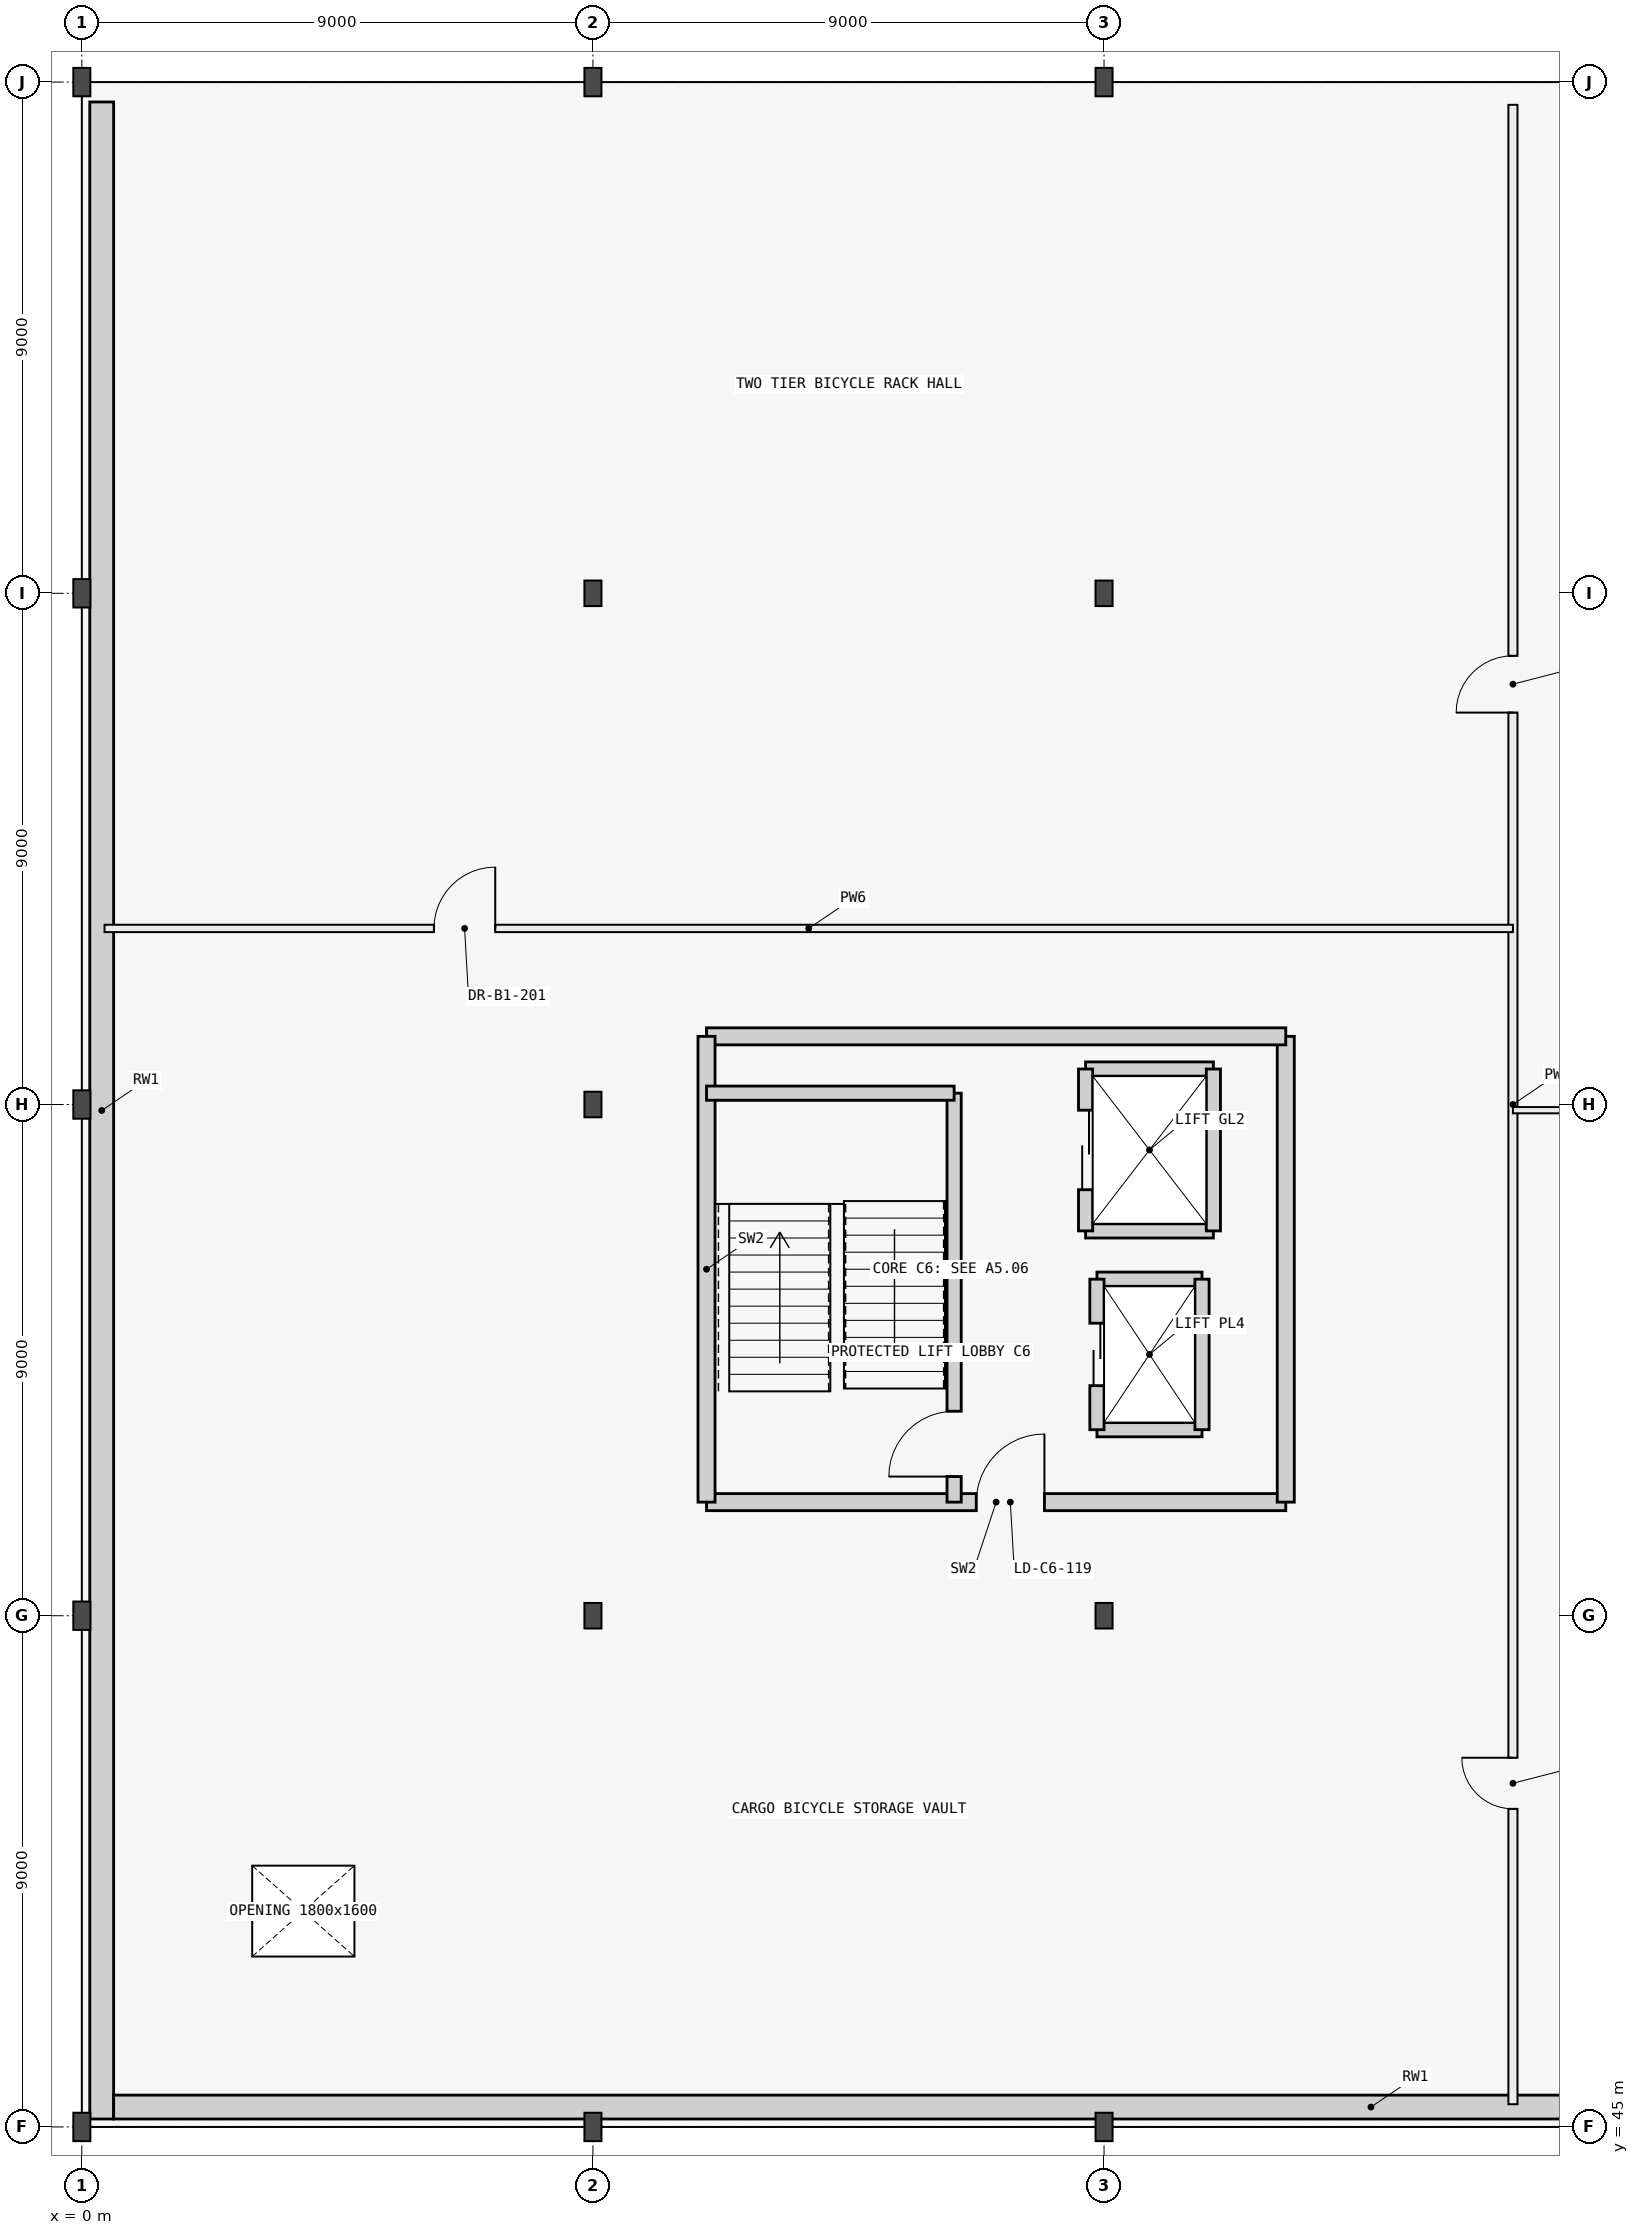
"""IFC4 building model, lengths in metres.
Left out: names, types, materials, properties, quantities, classifications, styles, units other than length and angle.
Written with IfcOpenShell. Run it as: python <this file> out.ifc"""

import sys

from ifc_helpers import new_model, si_unit, direction, frame, frame_2d, origin, origin_2d, place, context, subcontext, project, spatial, rectangle, i_section, extrude, element, fill, save


model = new_model("IFC4")
c1 = context("Model", 3, precision=1e-05, world=origin(), true_north=direction((0.0, 1.0)))
c2 = subcontext(c1, "Body", "Model", "MODEL_VIEW")
j1 = project(units=[si_unit("LENGTHUNIT", "METRE"), si_unit("PLANEANGLEUNIT", "RADIAN")], contexts=[c1])
p1 = place(None, origin())
s1 = spatial("IfcSite", under=j1, at=p1, CompositionType="ELEMENT")
p2 = place(p1, origin())
s2 = spatial("IfcBuilding", under=s1, at=p2, CompositionType="ELEMENT")
p3 = place(p2, frame((0.0, 0.0, -4.2)))
s3 = spatial("IfcBuildingStorey", under=s2, at=p3, CompositionType="ELEMENT", Elevation=-4.2)
for number, where, z_axis, x_axis in (
    (1, (0.0, 45.0, 0.0), (0.0, 0.0, 1.0), (1.0, 0.0, 0.0)),
    (2, (9.0, 45.0, 0.0), (0.0, 0.0, 1.0), (1.0, 0.0, 0.0)),
    (3, (18.0, 45.0, 0.0), (0.0, 0.0, 1.0), (1.0, 0.0, 0.0)),
    (4, (0.0, 54.0, 0.0), (0.0, 0.0, 1.0), (1.0, 0.0, 0.0)),
):
    element("IfcColumn", number, at=place(p3, frame(where, z_axis=z_axis, x_axis=x_axis)), inside=s3, PredefinedType="COLUMN", context=c2, shape_type="SweptSolid", body=[
        extrude(i_section(OverallWidth=0.3, OverallDepth=0.5, WebThickness=0.014, FlangeThickness=0.028, FilletRadius=0.027, at=origin_2d()), origin(), (0.0, 0.0, 1.0), 4.2),
    ])
for number, where, z_axis, x_axis in (
    (5, (9.0, 54.0, 0.0), (0.0, 0.0, 1.0), (1.0, 0.0, 0.0)),
    (6, (18.0, 54.0, 0.0), (0.0, 0.0, 1.0), (1.0, 0.0, 0.0)),
):
    element("IfcColumn", number, at=place(p3, frame(where, z_axis=z_axis, x_axis=x_axis)), inside=s3, PredefinedType="COLUMN", context=c2, shape_type="SweptSolid", body=[
        extrude(i_section(OverallWidth=0.3, OverallDepth=0.45, WebThickness=0.014, FlangeThickness=0.026, FilletRadius=0.027, at=origin_2d()), origin(), (0.0, 0.0, 1.0), 4.2),
    ])
p4 = place(p3, frame((0.0, 63.0, 0.0), z_axis=(0.0, 0.0, 1.0), x_axis=(1.0, 0.0, 0.0)))
e7 = element("IfcColumn", 7, at=p4, inside=s3, PredefinedType="COLUMN", context=c2, shape_type="SweptSolid", body=[
    extrude(i_section(OverallWidth=0.3, OverallDepth=0.5, WebThickness=0.014, FlangeThickness=0.028, FilletRadius=0.027, at=origin_2d()), origin(), (0.0, 0.0, 1.0), 4.2),
])
p5 = place(p3, frame((9.0, 63.0, 0.0), z_axis=(0.0, 0.0, 1.0), x_axis=(1.0, 0.0, 0.0)))
e8 = element("IfcColumn", 8, at=p5, inside=s3, PredefinedType="COLUMN", context=c2, shape_type="SweptSolid", body=[
    extrude(i_section(OverallWidth=0.3, OverallDepth=0.45, WebThickness=0.014, FlangeThickness=0.026, FilletRadius=0.027, at=origin_2d()), origin(), (0.0, 0.0, 1.0), 4.2),
])
p6 = place(p3, frame((0.0, 72.0, 0.0), z_axis=(0.0, 0.0, 1.0), x_axis=(1.0, 0.0, 0.0)))
e9 = element("IfcColumn", 9, at=p6, inside=s3, PredefinedType="COLUMN", context=c2, shape_type="SweptSolid", body=[
    extrude(i_section(OverallWidth=0.3, OverallDepth=0.5, WebThickness=0.014, FlangeThickness=0.028, FilletRadius=0.027, at=origin_2d()), origin(), (0.0, 0.0, 1.0), 4.2),
])
for number, where, z_axis, x_axis in (
    (10, (9.0, 72.0, 0.0), (0.0, 0.0, 1.0), (1.0, 0.0, 0.0)),
    (11, (18.0, 72.0, 0.0), (0.0, 0.0, 1.0), (1.0, 0.0, 0.0)),
):
    element("IfcColumn", number, at=place(p3, frame(where, z_axis=z_axis, x_axis=x_axis)), inside=s3, PredefinedType="COLUMN", context=c2, shape_type="SweptSolid", body=[
        extrude(i_section(OverallWidth=0.3, OverallDepth=0.45, WebThickness=0.014, FlangeThickness=0.026, FilletRadius=0.027, at=origin_2d()), origin(), (0.0, 0.0, 1.0), 4.2),
    ])
for number, where, z_axis, x_axis in (
    (12, (0.0, 81.0, 0.0), (0.0, 0.0, 1.0), (1.0, 0.0, 0.0)),
    (13, (9.0, 81.0, 0.0), (0.0, 0.0, 1.0), (1.0, 0.0, 0.0)),
    (14, (18.0, 81.0, 0.0), (0.0, 0.0, 1.0), (1.0, 0.0, 0.0)),
):
    element("IfcColumn", number, at=place(p3, frame(where, z_axis=z_axis, x_axis=x_axis)), inside=s3, PredefinedType="COLUMN", context=c2, shape_type="SweptSolid", body=[
        extrude(i_section(OverallWidth=0.3, OverallDepth=0.5, WebThickness=0.014, FlangeThickness=0.028, FilletRadius=0.027, at=origin_2d()), origin(), (0.0, 0.0, 1.0), 4.2),
    ])
p7 = place(p3, frame((0.35, 45.14, 0.0), z_axis=(0.0, 0.0, 1.0), x_axis=(0.0, 1.0, 0.0)))
e15 = element("IfcWall", 15, at=p7, inside=s3, PredefinedType="USERDEFINED", context=c2, shape_type="SweptSolid", body=[
    extrude(rectangle(XDim=35.51, YDim=0.42, at=frame_2d((17.755, 0.0))), origin(), (0.0, 0.0, 1.0), 3.6),
])
p8 = place(p3, frame((0.56, 45.35, 0.0), z_axis=(0.0, 0.0, 1.0), x_axis=(1.0, 0.0, 0.0)))
e16 = element("IfcWall", 16, at=p8, inside=s3, PredefinedType="USERDEFINED", context=c2, shape_type="SweptSolid", body=[
    extrude(rectangle(XDim=44.28, YDim=0.42, at=frame_2d((22.14, 0.0))), origin(), (0.0, 0.0, 1.0), 3.6),
])
p9 = place(p3, frame((11.0, 56.0, 0.0), z_axis=(0.0, 0.0, 1.0), x_axis=(1.0, 0.0, 0.0)))
e17 = element("IfcWall", 17, at=p9, inside=s3, PredefinedType="SHEAR", context=c2, shape_type="SweptSolid", body=[
    extrude(rectangle(XDim=10.2, YDim=0.3, at=frame_2d((5.1, 0.0))), origin(), (0.0, 0.0, 1.0), 3.94),
])
p10 = place(p9, frame((4.75, 0.0, 0.0)))
e18 = element("IfcOpeningElement", 18, at=p10, cuts=e17, PredefinedType="OPENING", context=c2, shape_type="SweptSolid", body=[
    extrude(rectangle(XDim=1.2, YDim=2.15, at=frame_2d((0.6, 1.075))), frame((0.0, 0.16, 0.0), z_axis=(0.0, -1.0, 0.0), x_axis=(1.0, 0.0, 0.0)), (0.0, 0.0, 1.0), 0.32),
])
p11 = place(p3, frame((21.2, 56.0, 0.0), z_axis=(0.0, 0.0, 1.0), x_axis=(0.0, 1.0, 0.0)))
e19 = element("IfcWall", 19, at=p11, inside=s3, PredefinedType="SHEAR", context=c2, shape_type="SweptSolid", body=[
    extrude(rectangle(XDim=8.2, YDim=0.3, at=frame_2d((4.1, 0.0))), origin(), (0.0, 0.0, 1.0), 3.94),
])
p12 = place(p3, frame((21.2, 64.2, 0.0), z_axis=(0.0, 0.0, 1.0), x_axis=(-1.0, 0.0, 0.0)))
e20 = element("IfcWall", 20, at=p12, inside=s3, PredefinedType="SHEAR", context=c2, shape_type="SweptSolid", body=[
    extrude(rectangle(XDim=10.2, YDim=0.3, at=frame_2d((5.1, 0.0))), origin(), (0.0, 0.0, 1.0), 3.94),
])
p13 = place(p3, frame((11.0, 64.2, 0.0), z_axis=(0.0, 0.0, 1.0), x_axis=(0.0, -1.0, 0.0)))
e21 = element("IfcWall", 21, at=p13, inside=s3, PredefinedType="SHEAR", context=c2, shape_type="SweptSolid", body=[
    extrude(rectangle(XDim=8.2, YDim=0.3, at=frame_2d((4.1, 0.0))), origin(), (0.0, 0.0, 1.0), 3.94),
])
p14 = place(p3, frame((15.36, 56.0, 0.0), z_axis=(0.0, 0.0, 1.0), x_axis=(0.0, 1.0, 0.0)))
e22 = element("IfcWall", 22, at=p14, inside=s3, PredefinedType="SHEAR", context=c2, shape_type="SweptSolid", body=[
    extrude(rectangle(XDim=7.2, YDim=0.25, at=frame_2d((3.6, 0.0))), origin(), (0.0, 0.0, 1.0), 3.94),
])
p15 = place(p14, frame((0.45, 0.0, 0.0)))
e23 = element("IfcOpeningElement", 23, at=p15, cuts=e22, PredefinedType="OPENING", context=c2, shape_type="SweptSolid", body=[
    extrude(rectangle(XDim=1.15, YDim=2.15, at=frame_2d((0.575, 1.075))), frame((0.0, 0.135, 0.0), z_axis=(0.0, -1.0, 0.0), x_axis=(1.0, 0.0, 0.0)), (0.0, 0.0, 1.0), 0.27),
])
p16 = place(p3, frame((11.0, 63.2, 0.0), z_axis=(0.0, 0.0, 1.0), x_axis=(1.0, 0.0, 0.0)))
e24 = element("IfcWall", 24, at=p16, inside=s3, PredefinedType="SHEAR", context=c2, shape_type="SweptSolid", body=[
    extrude(rectangle(XDim=4.36, YDim=0.25, at=frame_2d((2.18, 0.0))), origin(), (0.0, 0.0, 1.0), 3.94),
])
for number, where, z_axis, x_axis in (
    (25, (17.875, 57.275, 0.0), (0.0, 0.0, 1.0), (1.0, 0.0, 0.0)),
    (26, (17.875, 59.925, 0.0), (0.0, 0.0, 1.0), (1.0, 0.0, 0.0)),
):
    element("IfcWall", number, at=place(p3, frame(where, z_axis=z_axis, x_axis=x_axis)), inside=s3, PredefinedType="SHEAR", context=c2, shape_type="SweptSolid", body=[
        extrude(rectangle(XDim=1.85, YDim=0.25, at=frame_2d((0.925, 0.0))), origin(), (0.0, 0.0, 1.0), 3.94),
    ])
p17 = place(p3, frame((19.725, 57.275, 0.0), z_axis=(0.0, 0.0, 1.0), x_axis=(0.0, 1.0, 0.0)))
e27 = element("IfcWall", 27, at=p17, inside=s3, PredefinedType="SHEAR", context=c2, shape_type="SweptSolid", body=[
    extrude(rectangle(XDim=2.65, YDim=0.25, at=frame_2d((1.325, 0.0))), origin(), (0.0, 0.0, 1.0), 3.94),
])
p18 = place(p3, frame((17.875, 57.275, 0.0), z_axis=(0.0, 0.0, 1.0), x_axis=(0.0, 1.0, 0.0)))
e28 = element("IfcWall", 28, at=p18, inside=s3, PredefinedType="SHEAR", context=c2, shape_type="SweptSolid", body=[
    extrude(rectangle(XDim=2.65, YDim=0.25, at=frame_2d((1.325, 0.0))), origin(), (0.0, 0.0, 1.0), 3.94),
])
p19 = place(p18, frame((0.775, 0.0, 0.0)))
e29 = element("IfcOpeningElement", 29, at=p19, cuts=e28, PredefinedType="OPENING", context=c2, shape_type="SweptSolid", body=[
    extrude(rectangle(XDim=1.1, YDim=2.15, at=frame_2d((0.55, 1.075))), frame((0.0, 0.135, 0.0), z_axis=(0.0, -1.0, 0.0), x_axis=(1.0, 0.0, 0.0)), (0.0, 0.0, 1.0), 0.27),
])
for number, where, z_axis, x_axis in (
    (30, (17.675, 60.775, 0.0), (0.0, 0.0, 1.0), (1.0, 0.0, 0.0)),
    (31, (17.675, 63.625, 0.0), (0.0, 0.0, 1.0), (1.0, 0.0, 0.0)),
):
    element("IfcWall", number, at=place(p3, frame(where, z_axis=z_axis, x_axis=x_axis)), inside=s3, PredefinedType="SHEAR", context=c2, shape_type="SweptSolid", body=[
        extrude(rectangle(XDim=2.25, YDim=0.25, at=frame_2d((1.125, 0.0))), origin(), (0.0, 0.0, 1.0), 3.94),
    ])
p20 = place(p3, frame((19.925, 60.775, 0.0), z_axis=(0.0, 0.0, 1.0), x_axis=(0.0, 1.0, 0.0)))
e32 = element("IfcWall", 32, at=p20, inside=s3, PredefinedType="SHEAR", context=c2, shape_type="SweptSolid", body=[
    extrude(rectangle(XDim=2.85, YDim=0.25, at=frame_2d((1.425, 0.0))), origin(), (0.0, 0.0, 1.0), 3.94),
])
p21 = place(p3, frame((17.675, 60.775, 0.0), z_axis=(0.0, 0.0, 1.0), x_axis=(0.0, 1.0, 0.0)))
e33 = element("IfcWall", 33, at=p21, inside=s3, PredefinedType="SHEAR", context=c2, shape_type="SweptSolid", body=[
    extrude(rectangle(XDim=2.85, YDim=0.25, at=frame_2d((1.425, 0.0))), origin(), (0.0, 0.0, 1.0), 3.94),
])
p22 = place(p21, frame((0.725, 0.0, 0.0)))
e34 = element("IfcOpeningElement", 34, at=p22, cuts=e33, PredefinedType="OPENING", context=c2, shape_type="SweptSolid", body=[
    extrude(rectangle(XDim=1.4, YDim=2.2, at=frame_2d((0.7, 1.1))), frame((0.0, 0.135, 0.0), z_axis=(0.0, -1.0, 0.0), x_axis=(1.0, 0.0, 0.0)), (0.0, 0.0, 1.0), 0.27),
])
p23 = place(p3, frame((25.2, 45.4, 0.0), z_axis=(0.0, 0.0, 1.0), x_axis=(0.0, 1.0, 0.0)))
e35 = element("IfcWall", 35, at=p23, inside=s3, PredefinedType="PARTITIONING", context=c2, shape_type="SweptSolid", body=[
    extrude(rectangle(XDim=35.2, YDim=0.16, at=frame_2d((17.6, 0.0))), origin(), (0.0, 0.0, 1.0), 3.94),
])
p24 = place(p23, frame((5.2, 0.0, 0.0)))
e36 = element("IfcOpeningElement", 36, at=p24, cuts=e35, PredefinedType="OPENING", context=c2, shape_type="SweptSolid", body=[
    extrude(rectangle(XDim=0.9, YDim=2.1, at=frame_2d((0.45, 1.05))), frame((0.0, 0.09, 0.0), z_axis=(0.0, -1.0, 0.0), x_axis=(1.0, 0.0, 0.0)), (0.0, 0.0, 1.0), 0.18),
])
p25 = place(p23, frame((24.5, 0.0, 0.0)))
e37 = element("IfcOpeningElement", 37, at=p25, cuts=e35, PredefinedType="OPENING", context=c2, shape_type="SweptSolid", body=[
    extrude(rectangle(XDim=1.0, YDim=2.1, at=frame_2d((0.5, 1.05))), frame((0.0, 0.09, 0.0), z_axis=(0.0, -1.0, 0.0), x_axis=(1.0, 0.0, 0.0)), (0.0, 0.0, 1.0), 0.18),
])
p26 = place(p3, frame((0.4, 66.1, 0.0), z_axis=(0.0, 0.0, 1.0), x_axis=(1.0, 0.0, 0.0)))
e38 = element("IfcWall", 38, at=p26, inside=s3, PredefinedType="PARTITIONING", context=c2, shape_type="SweptSolid", body=[
    extrude(rectangle(XDim=24.8, YDim=0.13, at=frame_2d((12.4, 0.0))), origin(), (0.0, 0.0, 1.0), 3.94),
])
p27 = place(p26, frame((5.8, 0.0, 0.0)))
e39 = element("IfcOpeningElement", 39, at=p27, cuts=e38, PredefinedType="OPENING", context=c2, shape_type="SweptSolid", body=[
    extrude(rectangle(XDim=1.08, YDim=2.12, at=frame_2d((0.54, 1.06))), frame((0.0, 0.075, 0.0), z_axis=(0.0, -1.0, 0.0), x_axis=(1.0, 0.0, 0.0)), (0.0, 0.0, 1.0), 0.15),
])
p28 = place(p3, frame((25.2, 62.9, 0.0), z_axis=(0.0, 0.0, 1.0), x_axis=(1.0, 0.0, 0.0)))
e40 = element("IfcWall", 40, at=p28, inside=s3, PredefinedType="PARTITIONING", context=c2, shape_type="SweptSolid", body=[
    extrude(rectangle(XDim=23.975, YDim=0.11, at=frame_2d((11.988, 0.0))), origin(), (0.0, 0.0, 1.0), 3.415),
])
p29 = place(p28, frame((6.5, 0.0, 0.0)))
e41 = element("IfcOpeningElement", 41, at=p29, cuts=e40, PredefinedType="OPENING", context=c2, shape_type="SweptSolid", body=[
    extrude(rectangle(XDim=1.18, YDim=2.15, at=frame_2d((0.59, 1.075))), frame((0.0, 0.065, 0.0), z_axis=(0.0, -1.0, 0.0), x_axis=(1.0, 0.0, 0.0)), (0.0, 0.0, 1.0), 0.13),
])
p30 = place(p15, origin())
e42 = element("IfcDoor", 42, at=p30, inside=s3, OperationType="SINGLE_SWING_LEFT", PredefinedType="DOOR", context=c2, shape_type="SweptSolid", body=[
    extrude(rectangle(XDim=1.15, YDim=2.15, at=frame_2d((0.575, 1.075))), frame((0.0, 0.025, 0.0), z_axis=(0.0, -1.0, 0.0), x_axis=(1.0, 0.0, 0.0)), (0.0, 0.0, 1.0), 0.05),
])
fill(e23, e42)
p31 = place(p10, origin())
e43 = element("IfcDoor", 43, at=p31, inside=s3, OperationType="SINGLE_SWING_RIGHT", PredefinedType="DOOR", context=c2, shape_type="SweptSolid", body=[
    extrude(rectangle(XDim=1.2, YDim=2.15, at=frame_2d((0.6, 1.075))), frame((0.0, 0.025, 0.0), z_axis=(0.0, -1.0, 0.0), x_axis=(1.0, 0.0, 0.0)), (0.0, 0.0, 1.0), 0.05),
])
fill(e18, e43)
p32 = place(p19, origin())
e44 = element("IfcDoor", 44, at=p32, inside=s3, OperationType="DOUBLE_DOOR_SLIDING", PredefinedType="USERDEFINED", context=c2, shape_type="SweptSolid", body=[
    extrude(rectangle(XDim=1.1, YDim=2.15, at=frame_2d((0.55, 1.075))), frame((0.0, 0.025, 0.0), z_axis=(0.0, -1.0, 0.0), x_axis=(1.0, 0.0, 0.0)), (0.0, 0.0, 1.0), 0.05),
])
fill(e29, e44)
p33 = place(p22, origin())
e45 = element("IfcDoor", 45, at=p33, inside=s3, OperationType="DOUBLE_DOOR_SLIDING", PredefinedType="USERDEFINED", context=c2, shape_type="SweptSolid", body=[
    extrude(rectangle(XDim=1.4, YDim=2.2, at=frame_2d((0.7, 1.1))), frame((0.0, 0.025, 0.0), z_axis=(0.0, -1.0, 0.0), x_axis=(1.0, 0.0, 0.0)), (0.0, 0.0, 1.0), 0.05),
])
fill(e34, e45)
p34 = place(p24, origin())
e46 = element("IfcDoor", 46, at=p34, inside=s3, OperationType="SINGLE_SWING_RIGHT", PredefinedType="DOOR", context=c2, shape_type="SweptSolid", body=[
    extrude(rectangle(XDim=0.9, YDim=2.1, at=frame_2d((0.45, 1.05))), frame((0.0, 0.025, 0.0), z_axis=(0.0, -1.0, 0.0), x_axis=(1.0, 0.0, 0.0)), (0.0, 0.0, 1.0), 0.05),
])
fill(e36, e46)
p35 = place(p25, origin())
e47 = element("IfcDoor", 47, at=p35, inside=s3, OperationType="SINGLE_SWING_LEFT", PredefinedType="DOOR", context=c2, shape_type="SweptSolid", body=[
    extrude(rectangle(XDim=1.0, YDim=2.1, at=frame_2d((0.5, 1.05))), frame((0.0, 0.025, 0.0), z_axis=(0.0, -1.0, 0.0), x_axis=(1.0, 0.0, 0.0)), (0.0, 0.0, 1.0), 0.05),
])
fill(e37, e47)
p36 = place(p27, origin())
e48 = element("IfcDoor", 48, at=p36, inside=s3, OperationType="SINGLE_SWING_RIGHT", PredefinedType="DOOR", context=c2, shape_type="SweptSolid", body=[
    extrude(rectangle(XDim=1.08, YDim=2.12, at=frame_2d((0.54, 1.06))), frame((0.0, 0.025, 0.0), z_axis=(0.0, -1.0, 0.0), x_axis=(1.0, 0.0, 0.0)), (0.0, 0.0, 1.0), 0.05),
])
fill(e39, e48)
save(model, sys.argv[1])
